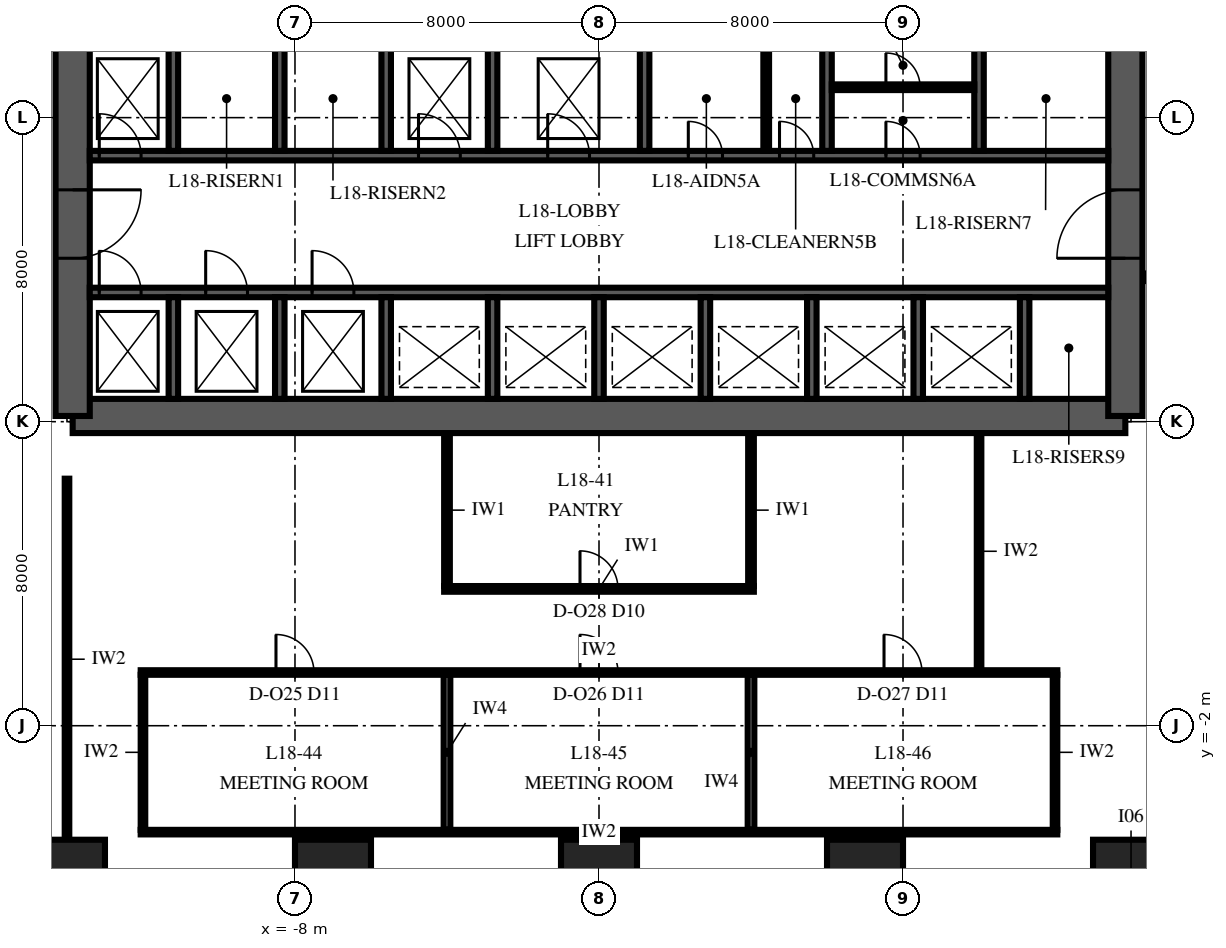
"""IFC4 building model, lengths in metres.
Left out: names, types, materials, properties, quantities, classifications, styles, units other than length and angle.
Written with IfcOpenShell. Run it as: python <this file> out.ifc"""

import sys

from ifc_helpers import new_model, si_unit, direction, frame, frame_2d, origin, origin_2d, place, context, subcontext, project, spatial, polyline, rectangle, outline, extrude, element, fill, save


model = new_model("IFC4")
c1 = context("Model", 3, precision=1e-05, world=origin(), true_north=direction((0.0, 1.0)))
c2 = subcontext(c1, "Body", "Model", "MODEL_VIEW")
j1 = project(units=[si_unit("LENGTHUNIT", "METRE"), si_unit("PLANEANGLEUNIT", "RADIAN")], contexts=[c1])
p1 = place(None, origin())
s1 = spatial("IfcSite", under=j1, at=p1, CompositionType="ELEMENT")
p2 = place(p1, origin())
s2 = spatial("IfcBuilding", under=s1, at=p2, CompositionType="ELEMENT")
p3 = place(p2, frame((0.0, 0.0, 84.0)))
s3 = spatial("IfcBuildingStorey", under=s2, at=p3, CompositionType="ELEMENT", Elevation=84.0)
for number, where, z_axis, x_axis in (
    (1, (-14.0, -6.0, 0.0), (0.0, 0.0, 1.0), (1.0, 0.0, 0.0)),
    (2, (-7.0, -6.0, 0.0), (0.0, 0.0, 1.0), (1.0, 0.0, 0.0)),
    (3, (0.0, -6.0, 0.0), (0.0, 0.0, 1.0), (1.0, 0.0, 0.0)),
    (4, (7.0, -6.0, 0.0), (0.0, 0.0, 1.0), (1.0, 0.0, 0.0)),
    (5, (14.0, -6.0, 0.0), (0.0, 0.0, 1.0), (1.0, 0.0, 0.0)),
):
    element("IfcColumn", number, at=place(p3, frame(where, z_axis=z_axis, x_axis=x_axis)), inside=s3, PredefinedType="COLUMN", context=c2, shape_type="SweptSolid", body=[
        extrude(rectangle(XDim=2.0, YDim=2.0, at=origin_2d()), origin(), (0.0, 0.0, 1.0), 4.0),
    ])
p4 = place(p3, frame((-13.85, 6.15, 0.0), z_axis=(0.0, 0.0, 1.0), x_axis=(1.0, 0.0, 0.0)))
e6 = element("IfcWall", 6, at=p4, inside=s3, PredefinedType="SHEAR", context=c2, shape_type="SweptSolid", body=[
    extrude(rectangle(XDim=27.7, YDim=0.9, at=frame_2d((13.85, 0.0))), origin(), (0.0, 0.0, 1.0), 4.0),
])
p5 = place(p3, frame((13.85, 6.15, 0.0), z_axis=(0.0, 0.0, 1.0), x_axis=(0.0, 1.0, 0.0)))
e7 = element("IfcWall", 7, at=p5, inside=s3, PredefinedType="SHEAR", context=c2, shape_type="SweptSolid", body=[
    extrude(outline(polyline([(0.0, -0.45), (17.7, -0.45), (17.7, 0.0), (17.25, 0.0), (17.25, 0.45), (0.45, 0.45), (0.45, 0.0), (0.0, 0.0), (0.0, -0.45)])), origin(), (0.0, 0.0, 1.0), 4.0),
])
p6 = place(p5, frame((4.15, 0.0, 0.0)))
e8 = element("IfcOpeningElement", 8, at=p6, cuts=e7, PredefinedType="OPENING", context=c2, shape_type="SweptSolid", body=[
    extrude(rectangle(XDim=1.8, YDim=2.4, at=frame_2d((0.9, 1.2))), frame((0.0, 0.465, 0.0), z_axis=(0.0, -1.0, 0.0), x_axis=(1.0, 0.0, 0.0)), (0.0, 0.0, 1.0), 0.93),
])
p7 = place(p3, frame((-13.85, 23.85, 0.0), z_axis=(0.0, 0.0, 1.0), x_axis=(0.0, -1.0, 0.0)))
e9 = element("IfcWall", 9, at=p7, inside=s3, PredefinedType="SHEAR", context=c2, shape_type="SweptSolid", body=[
    extrude(outline(polyline([(0.0, -0.45), (17.7, -0.45), (17.7, 0.0), (17.25, 0.0), (17.25, 0.45), (0.45, 0.45), (0.45, 0.0), (0.0, 0.0), (0.0, -0.45)])), origin(), (0.0, 0.0, 1.0), 4.0),
])
p8 = place(p7, frame((11.75, 0.0, 0.0)))
e10 = element("IfcOpeningElement", 10, at=p8, cuts=e9, PredefinedType="OPENING", context=c2, shape_type="SweptSolid", body=[
    extrude(rectangle(XDim=1.8, YDim=2.4, at=frame_2d((0.9, 1.2))), frame((0.0, 0.465, 0.0), z_axis=(0.0, -1.0, 0.0), x_axis=(1.0, 0.0, 0.0)), (0.0, 0.0, 1.0), 0.93),
])
p9 = place(p3, frame((-13.4, 9.4, 0.0), z_axis=(0.0, 0.0, 1.0), x_axis=(1.0, 0.0, 0.0)))
e11 = element("IfcWall", 11, at=p9, inside=s3, PredefinedType="SHEAR", context=c2, shape_type="SweptSolid", body=[
    extrude(rectangle(XDim=26.8, YDim=0.25, at=frame_2d((13.4, 0.0))), origin(), (0.0, 0.0, 1.0), 4.0),
])
p10 = place(p9, frame((0.25, 0.0, 0.0)))
e12 = element("IfcOpeningElement", 12, at=p10, cuts=e11, PredefinedType="OPENING", context=c2, shape_type="SweptSolid", body=[
    extrude(rectangle(XDim=1.1, YDim=2.1, at=frame_2d((0.55, 1.05))), frame((0.0, 0.14, 0.0), z_axis=(0.0, -1.0, 0.0), x_axis=(1.0, 0.0, 0.0)), (0.0, 0.0, 1.0), 0.28),
])
p11 = place(p9, frame((3.05, 0.0, 0.0)))
e13 = element("IfcOpeningElement", 13, at=p11, cuts=e11, PredefinedType="OPENING", context=c2, shape_type="SweptSolid", body=[
    extrude(rectangle(XDim=1.1, YDim=2.1, at=frame_2d((0.55, 1.05))), frame((0.0, 0.14, 0.0), z_axis=(0.0, -1.0, 0.0), x_axis=(1.0, 0.0, 0.0)), (0.0, 0.0, 1.0), 0.28),
])
p12 = place(p9, frame((5.85, 0.0, 0.0)))
e14 = element("IfcOpeningElement", 14, at=p12, cuts=e11, PredefinedType="OPENING", context=c2, shape_type="SweptSolid", body=[
    extrude(rectangle(XDim=1.1, YDim=2.1, at=frame_2d((0.55, 1.05))), frame((0.0, 0.14, 0.0), z_axis=(0.0, -1.0, 0.0), x_axis=(1.0, 0.0, 0.0)), (0.0, 0.0, 1.0), 0.28),
])
p13 = place(p3, frame((-13.4, 13.0, 0.0), z_axis=(0.0, 0.0, 1.0), x_axis=(1.0, 0.0, 0.0)))
e15 = element("IfcWall", 15, at=p13, inside=s3, PredefinedType="SHEAR", context=c2, shape_type="SweptSolid", body=[
    extrude(rectangle(XDim=26.8, YDim=0.25, at=frame_2d((13.4, 0.0))), origin(), (0.0, 0.0, 1.0), 4.0),
])
p14 = place(p13, frame((0.25, 0.0, 0.0)))
e16 = element("IfcOpeningElement", 16, at=p14, cuts=e15, PredefinedType="OPENING", context=c2, shape_type="SweptSolid", body=[
    extrude(rectangle(XDim=1.1, YDim=2.1, at=frame_2d((0.55, 1.05))), frame((0.0, 0.14, 0.0), z_axis=(0.0, -1.0, 0.0), x_axis=(1.0, 0.0, 0.0)), (0.0, 0.0, 1.0), 0.28),
])
p15 = place(p13, frame((8.65, 0.0, 0.0)))
e17 = element("IfcOpeningElement", 17, at=p15, cuts=e15, PredefinedType="OPENING", context=c2, shape_type="SweptSolid", body=[
    extrude(rectangle(XDim=1.1, YDim=2.1, at=frame_2d((0.55, 1.05))), frame((0.0, 0.14, 0.0), z_axis=(0.0, -1.0, 0.0), x_axis=(1.0, 0.0, 0.0)), (0.0, 0.0, 1.0), 0.28),
])
p16 = place(p13, frame((12.05, 0.0, 0.0)))
e18 = element("IfcOpeningElement", 18, at=p16, cuts=e15, PredefinedType="OPENING", context=c2, shape_type="SweptSolid", body=[
    extrude(rectangle(XDim=1.1, YDim=2.1, at=frame_2d((0.55, 1.05))), frame((0.0, 0.14, 0.0), z_axis=(0.0, -1.0, 0.0), x_axis=(1.0, 0.0, 0.0)), (0.0, 0.0, 1.0), 0.28),
])
p17 = place(p13, frame((15.75, 0.0, 0.0)))
e19 = element("IfcOpeningElement", 19, at=p17, cuts=e15, PredefinedType="OPENING", context=c2, shape_type="SweptSolid", body=[
    extrude(rectangle(XDim=0.9, YDim=2.1, at=frame_2d((0.45, 1.05))), frame((0.0, 0.14, 0.0), z_axis=(0.0, -1.0, 0.0), x_axis=(1.0, 0.0, 0.0)), (0.0, 0.0, 1.0), 0.28),
])
p18 = place(p13, frame((18.15, 0.0, 0.0)))
e20 = element("IfcOpeningElement", 20, at=p18, cuts=e15, PredefinedType="OPENING", context=c2, shape_type="SweptSolid", body=[
    extrude(rectangle(XDim=0.9, YDim=2.1, at=frame_2d((0.45, 1.05))), frame((0.0, 0.14, 0.0), z_axis=(0.0, -1.0, 0.0), x_axis=(1.0, 0.0, 0.0)), (0.0, 0.0, 1.0), 0.28),
])
p19 = place(p13, frame((20.95, 0.0, 0.0)))
e21 = element("IfcOpeningElement", 21, at=p19, cuts=e15, PredefinedType="OPENING", context=c2, shape_type="SweptSolid", body=[
    extrude(rectangle(XDim=0.9, YDim=2.1, at=frame_2d((0.45, 1.05))), frame((0.0, 0.14, 0.0), z_axis=(0.0, -1.0, 0.0), x_axis=(1.0, 0.0, 0.0)), (0.0, 0.0, 1.0), 0.28),
])
for number, where, z_axis, x_axis in (
    (22, (-11.2, 6.6, 0.0), (0.0, 0.0, 1.0), (0.0, 1.0, 0.0)),
    (23, (-8.4, 6.6, 0.0), (0.0, 0.0, 1.0), (0.0, 1.0, 0.0)),
    (24, (-5.6, 6.6, 0.0), (0.0, 0.0, 1.0), (0.0, 1.0, 0.0)),
    (25, (-2.8, 6.6, 0.0), (0.0, 0.0, 1.0), (0.0, 1.0, 0.0)),
    (26, (0.0, 6.6, 0.0), (0.0, 0.0, 1.0), (0.0, 1.0, 0.0)),
    (27, (2.8, 6.6, 0.0), (0.0, 0.0, 1.0), (0.0, 1.0, 0.0)),
    (28, (5.6, 6.6, 0.0), (0.0, 0.0, 1.0), (0.0, 1.0, 0.0)),
    (29, (8.4, 6.6, 0.0), (0.0, 0.0, 1.0), (0.0, 1.0, 0.0)),
    (30, (11.2, 6.6, 0.0), (0.0, 0.0, 1.0), (0.0, 1.0, 0.0)),
):
    element("IfcWall", number, at=place(p3, frame(where, z_axis=z_axis, x_axis=x_axis)), inside=s3, PredefinedType="SHEAR", context=c2, shape_type="SweptSolid", body=[
        extrude(rectangle(XDim=2.675, YDim=0.25, at=frame_2d((1.337, 0.0))), origin(), (0.0, 0.0, 1.0), 4.0),
    ])
for number, where, z_axis, x_axis in (
    (31, (-11.2, 13.125, 0.0), (0.0, 0.0, 1.0), (0.0, 1.0, 0.0)),
    (32, (-8.4, 13.125, 0.0), (0.0, 0.0, 1.0), (0.0, 1.0, 0.0)),
    (33, (-5.6, 13.125, 0.0), (0.0, 0.0, 1.0), (0.0, 1.0, 0.0)),
    (34, (-2.8, 13.125, 0.0), (0.0, 0.0, 1.0), (0.0, 1.0, 0.0)),
    (35, (1.2, 13.125, 0.0), (0.0, 0.0, 1.0), (0.0, 1.0, 0.0)),
    (36, (6.0, 13.125, 0.0), (0.0, 0.0, 1.0), (0.0, 1.0, 0.0)),
    (37, (10.0, 13.125, 0.0), (0.0, 0.0, 1.0), (0.0, 1.0, 0.0)),
):
    element("IfcWall", number, at=place(p3, frame(where, z_axis=z_axis, x_axis=x_axis)), inside=s3, PredefinedType="SHEAR", context=c2, shape_type="SweptSolid", body=[
        extrude(rectangle(XDim=2.75, YDim=0.25, at=frame_2d((1.375, 0.0))), origin(), (0.0, 0.0, 1.0), 4.0),
    ])
p20 = place(p3, frame((4.4, 13.125, 0.0), z_axis=(0.0, 0.0, 1.0), x_axis=(0.0, 1.0, 0.0)))
e38 = element("IfcWall", 38, at=p20, inside=s3, PredefinedType="PARTITIONING", context=c2, shape_type="SweptSolid", body=[
    extrude(rectangle(XDim=2.75, YDim=0.15, at=frame_2d((1.375, 0.0))), origin(), (0.0, 0.0, 1.0), 3.85),
])
p21 = place(p3, frame((6.125, 14.8, 0.0), z_axis=(0.0, 0.0, 1.0), x_axis=(1.0, 0.0, 0.0)))
e39 = element("IfcWall", 39, at=p21, inside=s3, PredefinedType="PARTITIONING", context=c2, shape_type="SweptSolid", body=[
    extrude(rectangle(XDim=3.75, YDim=0.15, at=frame_2d((1.875, 0.0))), origin(), (0.0, 0.0, 1.0), 3.85),
])
p22 = place(p21, frame((1.425, 0.0, 0.0)))
e40 = element("IfcOpeningElement", 40, at=p22, cuts=e39, PredefinedType="OPENING", context=c2, shape_type="SweptSolid", body=[
    extrude(rectangle(XDim=0.9, YDim=2.1, at=frame_2d((0.45, 1.05))), frame((0.0, 0.09, 0.0), z_axis=(0.0, -1.0, 0.0), x_axis=(1.0, 0.0, 0.0)), (0.0, 0.0, 1.0), 0.18),
])
p23 = place(p3, frame((-12.06, -4.8, 0.0), z_axis=(0.0, 0.0, 1.0), x_axis=(1.0, 0.0, 0.0)))
e41 = element("IfcWall", 41, at=p23, inside=s3, PredefinedType="PARTITIONING", context=c2, shape_type="SweptSolid", body=[
    extrude(rectangle(XDim=24.12, YDim=0.12, at=frame_2d((12.06, 0.0))), origin(), (0.0, 0.0, 1.0), 3.25),
])
p24 = place(p3, frame((-12.06, -0.6, 0.0), z_axis=(0.0, 0.0, 1.0), x_axis=(1.0, 0.0, 0.0)))
e42 = element("IfcWall", 42, at=p24, inside=s3, PredefinedType="PARTITIONING", context=c2, shape_type="SweptSolid", body=[
    extrude(rectangle(XDim=24.12, YDim=0.12, at=frame_2d((12.06, 0.0))), origin(), (0.0, 0.0, 1.0), 3.25),
])
p25 = place(p24, frame((3.56, 0.0, 0.0)))
e43 = element("IfcOpeningElement", 43, at=p25, cuts=e42, PredefinedType="OPENING", context=c2, shape_type="SweptSolid", body=[
    extrude(rectangle(XDim=1.0, YDim=2.4, at=frame_2d((0.5, 1.2))), frame((0.0, 0.075, 0.0), z_axis=(0.0, -1.0, 0.0), x_axis=(1.0, 0.0, 0.0)), (0.0, 0.0, 1.0), 0.15),
])
p26 = place(p24, frame((11.56, 0.0, 0.0)))
e44 = element("IfcOpeningElement", 44, at=p26, cuts=e42, PredefinedType="OPENING", context=c2, shape_type="SweptSolid", body=[
    extrude(rectangle(XDim=1.0, YDim=2.4, at=frame_2d((0.5, 1.2))), frame((0.0, 0.075, 0.0), z_axis=(0.0, -1.0, 0.0), x_axis=(1.0, 0.0, 0.0)), (0.0, 0.0, 1.0), 0.15),
])
p27 = place(p24, frame((19.56, 0.0, 0.0)))
e45 = element("IfcOpeningElement", 45, at=p27, cuts=e42, PredefinedType="OPENING", context=c2, shape_type="SweptSolid", body=[
    extrude(rectangle(XDim=1.0, YDim=2.4, at=frame_2d((0.5, 1.2))), frame((0.0, 0.075, 0.0), z_axis=(0.0, -1.0, 0.0), x_axis=(1.0, 0.0, 0.0)), (0.0, 0.0, 1.0), 0.15),
])
p28 = place(p3, frame((-4.075, 1.6, 0.0), z_axis=(0.0, 0.0, 1.0), x_axis=(1.0, 0.0, 0.0)))
e46 = element("IfcWall", 46, at=p28, inside=s3, PredefinedType="PARTITIONING", context=c2, shape_type="SweptSolid", body=[
    extrude(rectangle(XDim=8.15, YDim=0.15, at=frame_2d((4.075, 0.0))), origin(), (0.0, 0.0, 1.0), 3.25),
])
p29 = place(p28, frame((3.575, 0.0, 0.0)))
e47 = element("IfcOpeningElement", 47, at=p29, cuts=e46, PredefinedType="OPENING", context=c2, shape_type="SweptSolid", body=[
    extrude(rectangle(XDim=1.0, YDim=2.3, at=frame_2d((0.5, 1.15))), frame((0.0, 0.09, 0.0), z_axis=(0.0, -1.0, 0.0), x_axis=(1.0, 0.0, 0.0)), (0.0, 0.0, 1.0), 0.18),
])
p30 = place(p3, frame((14.33, 9.8, 0.0), z_axis=(0.0, 0.0, 1.0), x_axis=(1.0, 0.0, 0.0)))
e48 = element("IfcWall", 48, at=p30, inside=s3, PredefinedType="PARTITIONING", context=c2, shape_type="SweptSolid", body=[
    extrude(rectangle(XDim=2.02, YDim=0.2, at=frame_2d((1.01, 0.0))), origin(), (0.0, 0.0, 1.0), 3.85),
])
p31 = place(p3, frame((-12.0, -4.74, 0.0), z_axis=(0.0, 0.0, 1.0), x_axis=(0.0, 1.0, 0.0)))
e49 = element("IfcWall", 49, at=p31, inside=s3, PredefinedType="PARTITIONING", context=c2, shape_type="SweptSolid", body=[
    extrude(rectangle(XDim=4.08, YDim=0.12, at=frame_2d((2.04, 0.0))), origin(), (0.0, 0.0, 1.0), 3.85),
])
p32 = place(p3, frame((-4.0, -4.74, 0.0), z_axis=(0.0, 0.0, 1.0), x_axis=(0.0, 1.0, 0.0)))
e50 = element("IfcWall", 50, at=p32, inside=s3, PredefinedType="PARTITIONING", context=c2, shape_type="SweptSolid", body=[
    extrude(rectangle(XDim=4.08, YDim=0.175, at=frame_2d((2.04, 0.0))), origin(), (0.0, 0.0, 1.0), 3.85),
])
p33 = place(p3, frame((-4.0, 1.675, 0.0), z_axis=(0.0, 0.0, 1.0), x_axis=(0.0, 1.0, 0.0)))
e51 = element("IfcWall", 51, at=p33, inside=s3, PredefinedType="PARTITIONING", context=c2, shape_type="SweptSolid", body=[
    extrude(rectangle(XDim=3.995, YDim=0.15, at=frame_2d((1.998, 0.0))), origin(), (0.0, 0.0, 1.0), 3.85),
])
p34 = place(p3, frame((4.0, -4.74, 0.0), z_axis=(0.0, 0.0, 1.0), x_axis=(0.0, 1.0, 0.0)))
e52 = element("IfcWall", 52, at=p34, inside=s3, PredefinedType="PARTITIONING", context=c2, shape_type="SweptSolid", body=[
    extrude(rectangle(XDim=4.08, YDim=0.175, at=frame_2d((2.04, 0.0))), origin(), (0.0, 0.0, 1.0), 3.85),
])
p35 = place(p3, frame((4.0, 1.675, 0.0), z_axis=(0.0, 0.0, 1.0), x_axis=(0.0, 1.0, 0.0)))
e53 = element("IfcWall", 53, at=p35, inside=s3, PredefinedType="PARTITIONING", context=c2, shape_type="SweptSolid", body=[
    extrude(rectangle(XDim=3.995, YDim=0.15, at=frame_2d((1.998, 0.0))), origin(), (0.0, 0.0, 1.0), 3.85),
])
p36 = place(p3, frame((12.0, -4.74, 0.0), z_axis=(0.0, 0.0, 1.0), x_axis=(0.0, 1.0, 0.0)))
e54 = element("IfcWall", 54, at=p36, inside=s3, PredefinedType="PARTITIONING", context=c2, shape_type="SweptSolid", body=[
    extrude(rectangle(XDim=4.08, YDim=0.12, at=frame_2d((2.04, 0.0))), origin(), (0.0, 0.0, 1.0), 3.85),
])
p37 = place(p3, frame((-13.999, -5.0, 0.0), z_axis=(0.0, 0.0, 1.0), x_axis=(0.0, 1.0, 0.0)))
e55 = element("IfcWall", 55, at=p37, inside=s3, PredefinedType="PARTITIONING", context=c2, shape_type="SweptSolid", body=[
    extrude(rectangle(XDim=9.5, YDim=0.12, at=frame_2d((4.75, 0.0))), origin(), (0.0, 0.0, 1.0), 3.25),
])
p38 = place(p3, frame((10.001, -0.52, 0.0), z_axis=(0.0, 0.0, 1.0), x_axis=(0.0, 1.0, 0.0)))
e56 = element("IfcWall", 56, at=p38, inside=s3, PredefinedType="PARTITIONING", context=c2, shape_type="SweptSolid", body=[
    extrude(rectangle(XDim=6.22, YDim=0.12, at=frame_2d((3.11, 0.0))), origin(), (0.0, 0.0, 1.0), 3.85),
])
p39 = place(p6, origin())
e57 = element("IfcDoor", 57, at=p39, inside=s3, OperationType="DOUBLE_DOOR_SINGLE_SWING", PredefinedType="DOOR", context=c2, shape_type="SweptSolid", body=[
    extrude(rectangle(XDim=1.8, YDim=2.4, at=frame_2d((0.9, 1.2))), frame((0.0, 0.45, 0.0), z_axis=(0.0, -1.0, 0.0), x_axis=(1.0, 0.0, 0.0)), (0.0, 0.0, 1.0), 0.899),
])
fill(e8, e57)
p40 = place(p8, origin())
e58 = element("IfcDoor", 58, at=p40, inside=s3, OperationType="DOUBLE_DOOR_SINGLE_SWING", PredefinedType="DOOR", context=c2, shape_type="SweptSolid", body=[
    extrude(rectangle(XDim=1.8, YDim=2.4, at=frame_2d((0.9, 1.2))), frame((0.0, 0.45, 0.0), z_axis=(0.0, -1.0, 0.0), x_axis=(1.0, 0.0, 0.0)), (0.0, 0.0, 1.0), 0.899),
])
fill(e10, e58)
p41 = place(p10, origin())
e59 = element("IfcDoor", 59, at=p41, inside=s3, OperationType="SLIDING_TO_LEFT", PredefinedType="DOOR", context=c2, shape_type="SweptSolid", body=[
    extrude(rectangle(XDim=1.1, YDim=2.1, at=frame_2d((0.55, 1.05))), frame((0.0, 0.125, 0.0), z_axis=(0.0, -1.0, 0.0), x_axis=(1.0, 0.0, 0.0)), (0.0, 0.0, 1.0), 0.25),
])
fill(e12, e59)
p42 = place(p11, origin())
e60 = element("IfcDoor", 60, at=p42, inside=s3, OperationType="SLIDING_TO_LEFT", PredefinedType="DOOR", context=c2, shape_type="SweptSolid", body=[
    extrude(rectangle(XDim=1.1, YDim=2.1, at=frame_2d((0.55, 1.05))), frame((0.0, 0.125, 0.0), z_axis=(0.0, -1.0, 0.0), x_axis=(1.0, 0.0, 0.0)), (0.0, 0.0, 1.0), 0.25),
])
fill(e13, e60)
p43 = place(p12, origin())
e61 = element("IfcDoor", 61, at=p43, inside=s3, OperationType="SLIDING_TO_LEFT", PredefinedType="DOOR", context=c2, shape_type="SweptSolid", body=[
    extrude(rectangle(XDim=1.1, YDim=2.1, at=frame_2d((0.55, 1.05))), frame((0.0, 0.125, 0.0), z_axis=(0.0, -1.0, 0.0), x_axis=(1.0, 0.0, 0.0)), (0.0, 0.0, 1.0), 0.25),
])
fill(e14, e61)
p44 = place(p14, origin())
e62 = element("IfcDoor", 62, at=p44, inside=s3, OperationType="SLIDING_TO_LEFT", PredefinedType="DOOR", context=c2, shape_type="SweptSolid", body=[
    extrude(rectangle(XDim=1.1, YDim=2.1, at=frame_2d((0.55, 1.05))), frame((0.0, 0.125, 0.0), z_axis=(0.0, -1.0, 0.0), x_axis=(1.0, 0.0, 0.0)), (0.0, 0.0, 1.0), 0.25),
])
fill(e16, e62)
p45 = place(p15, origin())
e63 = element("IfcDoor", 63, at=p45, inside=s3, OperationType="SLIDING_TO_LEFT", PredefinedType="DOOR", context=c2, shape_type="SweptSolid", body=[
    extrude(rectangle(XDim=1.1, YDim=2.1, at=frame_2d((0.55, 1.05))), frame((0.0, 0.125, 0.0), z_axis=(0.0, -1.0, 0.0), x_axis=(1.0, 0.0, 0.0)), (0.0, 0.0, 1.0), 0.25),
])
fill(e17, e63)
p46 = place(p16, origin())
e64 = element("IfcDoor", 64, at=p46, inside=s3, OperationType="SLIDING_TO_LEFT", PredefinedType="DOOR", context=c2, shape_type="SweptSolid", body=[
    extrude(rectangle(XDim=1.1, YDim=2.1, at=frame_2d((0.55, 1.05))), frame((0.0, 0.125, 0.0), z_axis=(0.0, -1.0, 0.0), x_axis=(1.0, 0.0, 0.0)), (0.0, 0.0, 1.0), 0.25),
])
fill(e18, e64)
p47 = place(p17, origin())
e65 = element("IfcDoor", 65, at=p47, inside=s3, OperationType="SINGLE_SWING_LEFT", PredefinedType="DOOR", context=c2, shape_type="SweptSolid", body=[
    extrude(rectangle(XDim=0.9, YDim=2.1, at=frame_2d((0.45, 1.05))), frame((0.0, 0.125, 0.0), z_axis=(0.0, -1.0, 0.0), x_axis=(1.0, 0.0, 0.0)), (0.0, 0.0, 1.0), 0.25),
])
fill(e19, e65)
p48 = place(p18, origin())
e66 = element("IfcDoor", 66, at=p48, inside=s3, OperationType="SINGLE_SWING_LEFT", PredefinedType="DOOR", context=c2, shape_type="SweptSolid", body=[
    extrude(rectangle(XDim=0.9, YDim=2.1, at=frame_2d((0.45, 1.05))), frame((0.0, 0.125, 0.0), z_axis=(0.0, -1.0, 0.0), x_axis=(1.0, 0.0, 0.0)), (0.0, 0.0, 1.0), 0.25),
])
fill(e20, e66)
p49 = place(p19, origin())
e67 = element("IfcDoor", 67, at=p49, inside=s3, OperationType="SINGLE_SWING_LEFT", PredefinedType="DOOR", context=c2, shape_type="SweptSolid", body=[
    extrude(rectangle(XDim=0.9, YDim=2.1, at=frame_2d((0.45, 1.05))), frame((0.0, 0.125, 0.0), z_axis=(0.0, -1.0, 0.0), x_axis=(1.0, 0.0, 0.0)), (0.0, 0.0, 1.0), 0.25),
])
fill(e21, e67)
p50 = place(p22, origin())
e68 = element("IfcDoor", 68, at=p50, inside=s3, OperationType="SINGLE_SWING_LEFT", PredefinedType="DOOR", context=c2, shape_type="SweptSolid", body=[
    extrude(rectangle(XDim=0.9, YDim=2.1, at=frame_2d((0.45, 1.05))), frame((0.0, 0.075, 0.0), z_axis=(0.0, -1.0, 0.0), x_axis=(1.0, 0.0, 0.0)), (0.0, 0.0, 1.0), 0.149),
])
fill(e40, e68)
p51 = place(p25, origin())
e69 = element("IfcDoor", 69, at=p51, inside=s3, OperationType="SINGLE_SWING_RIGHT", PredefinedType="DOOR", context=c2, shape_type="SweptSolid", body=[
    extrude(rectangle(XDim=1.0, YDim=2.4, at=frame_2d((0.5, 1.2))), frame((0.0, 0.06, 0.0), z_axis=(0.0, -1.0, 0.0), x_axis=(1.0, 0.0, 0.0)), (0.0, 0.0, 1.0), 0.12),
])
fill(e43, e69)
p52 = place(p26, origin())
e70 = element("IfcDoor", 70, at=p52, inside=s3, OperationType="SINGLE_SWING_RIGHT", PredefinedType="DOOR", context=c2, shape_type="SweptSolid", body=[
    extrude(rectangle(XDim=1.0, YDim=2.4, at=frame_2d((0.5, 1.2))), frame((0.0, 0.06, 0.0), z_axis=(0.0, -1.0, 0.0), x_axis=(1.0, 0.0, 0.0)), (0.0, 0.0, 1.0), 0.12),
])
fill(e44, e70)
p53 = place(p27, origin())
e71 = element("IfcDoor", 71, at=p53, inside=s3, OperationType="SINGLE_SWING_RIGHT", PredefinedType="DOOR", context=c2, shape_type="SweptSolid", body=[
    extrude(rectangle(XDim=1.0, YDim=2.4, at=frame_2d((0.5, 1.2))), frame((0.0, 0.06, 0.0), z_axis=(0.0, -1.0, 0.0), x_axis=(1.0, 0.0, 0.0)), (0.0, 0.0, 1.0), 0.12),
])
fill(e45, e71)
p54 = place(p29, origin())
e72 = element("IfcDoor", 72, at=p54, inside=s3, OperationType="SINGLE_SWING_LEFT", PredefinedType="DOOR", context=c2, shape_type="SweptSolid", body=[
    extrude(rectangle(XDim=1.0, YDim=2.3, at=frame_2d((0.5, 1.15))), frame((0.0, 0.075, 0.0), z_axis=(0.0, -1.0, 0.0), x_axis=(1.0, 0.0, 0.0)), (0.0, 0.0, 1.0), 0.149),
])
fill(e47, e72)
save(model, sys.argv[1])
